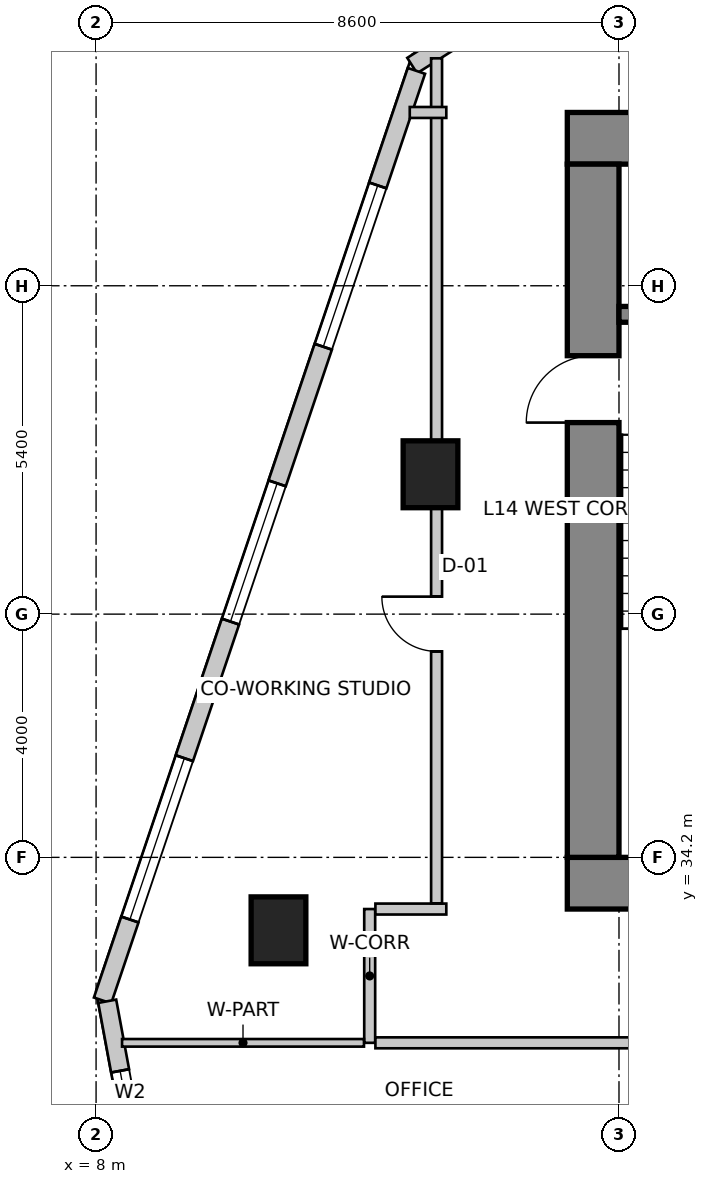
"""IFC4 building model, lengths in metres.
Left out: names, types, materials, properties, quantities, classifications, styles, units other than length and angle.
Written with IfcOpenShell. Run it as: python <this file> out.ifc"""

import sys

from ifc_helpers import new_model, si_unit, direction, frame, frame_2d, origin, origin_2d, place, context, subcontext, project, spatial, rectangle, extrude, source, transform, mapped, element, fill, save


model = new_model("IFC4")
c1 = context("Model", 3, precision=1e-05, world=origin(), true_north=direction((0.0, 1.0)))
c2 = subcontext(c1, "Body", "Model", "MODEL_VIEW")
j1 = project(units=[si_unit("LENGTHUNIT", "METRE"), si_unit("PLANEANGLEUNIT", "RADIAN")], contexts=[c1])
p1 = place(None, origin())
s1 = spatial("IfcSite", under=j1, at=p1, CompositionType="ELEMENT")
p2 = place(p1, origin())
s2 = spatial("IfcBuilding", under=s1, at=p2, CompositionType="ELEMENT")
p3 = place(p2, frame((0.0, 0.0, 59.0)))
s3 = spatial("IfcBuildingStorey", under=s2, at=p3, CompositionType="ELEMENT", Elevation=59.0)
p4 = place(p3, frame((15.75, 46.025, 0.0), z_axis=(0.0, 0.0, 1.0), x_axis=(1.0, 0.0, 0.0)))
e1 = element("IfcWall", 1, at=p4, inside=s3, PredefinedType="SHEAR", context=c2, shape_type="SweptSolid", body=[
    extrude(rectangle(XDim=16.1, YDim=0.85, at=frame_2d((8.05, 0.0))), origin(), (0.0, 0.0, 1.0), 4.0),
])
p5 = place(p3, frame((15.75, 33.775, 0.0), z_axis=(0.0, 0.0, 1.0), x_axis=(1.0, 0.0, 0.0)))
e2 = element("IfcWall", 2, at=p5, inside=s3, PredefinedType="SHEAR", context=c2, shape_type="SweptSolid", body=[
    extrude(rectangle(XDim=16.1, YDim=0.85, at=frame_2d((8.05, 0.0))), origin(), (0.0, 0.0, 1.0), 4.0),
])
m1 = source(origin(), c2, "Body", "SweptSolid", [
    extrude(rectangle(XDim=1.3, YDim=2.15, at=frame_2d((0.65, 1.075))), frame((0.0, 0.435, 0.0), z_axis=(0.0, -1.0, 0.0), x_axis=(1.0, 0.0, 0.0)), (0.0, 0.0, 1.0), 0.87),
])
p6 = place(p5, frame((10.18, 0.0, 0.0)))
e3 = element("IfcOpeningElement", 3, at=p6, cuts=e2, PredefinedType="OPENING", context=c2, shape_type="MappedRepresentation", body=[
    mapped(m1, transform((0.0, 0.0, 0.0), scale=1.0)),
])
p7 = place(p3, frame((16.175, 34.2, 0.0), z_axis=(0.0, 0.0, 1.0), x_axis=(0.0, 1.0, 0.0)))
e4 = element("IfcWall", 4, at=p7, inside=s3, PredefinedType="SHEAR", context=c2, shape_type="SweptSolid", body=[
    extrude(rectangle(XDim=11.4, YDim=0.85, at=frame_2d((5.7, 0.0))), origin(), (0.0, 0.0, 1.0), 4.0),
])
m2 = source(origin(), c2, "Body", "SweptSolid", [
    extrude(rectangle(XDim=1.1, YDim=2.15, at=frame_2d((0.55, 1.075))), frame((0.0, 0.435, 0.0), z_axis=(0.0, -1.0, 0.0), x_axis=(1.0, 0.0, 0.0)), (0.0, 0.0, 1.0), 0.87),
])
p8 = place(p7, frame((7.15, 0.0, 0.0)))
e5 = element("IfcOpeningElement", 5, at=p8, cuts=e4, PredefinedType="OPENING", context=c2, shape_type="MappedRepresentation", body=[
    mapped(m2, transform((0.0, 0.0, 0.0), scale=1.0)),
])
p9 = place(p3, frame((16.6, 43.13, 0.0), z_axis=(0.0, 0.0, 1.0), x_axis=(1.0, 0.0, 0.0)))
e6 = element("IfcWall", 6, at=p9, inside=s3, PredefinedType="SHEAR", context=c2, shape_type="SweptSolid", body=[
    extrude(rectangle(XDim=3.5, YDim=0.26, at=frame_2d((1.75, 0.0))), origin(), (0.0, 0.0, 1.0), 4.0),
])
m3 = source(origin(), c2, "Body", "SweptSolid", [
    extrude(rectangle(XDim=0.9, YDim=1.1, at=origin_2d()), origin(), (0.0, 0.0, 1.0), 4.0),
])
for number, where, z_axis, x_axis in (
    (7, (11.0, 33.0, 0.0), (0.0, 0.0, 1.0), (1.0, 0.0, 0.0)),
    (8, (13.5, 40.5, 0.0), (0.0, 0.0, 1.0), (1.0, 0.0, 0.0)),
):
    element("IfcColumn", number, at=place(p3, frame(where, z_axis=z_axis, x_axis=x_axis)), inside=s3, PredefinedType="COLUMN", context=c2, shape_type="MappedRepresentation", body=[
        mapped(m3, transform((0.0, 0.0, 0.0), scale=1.0)),
    ])
p10 = place(p3, frame((21.875, 52.743, 0.0), z_axis=(0.0, 0.0, 1.0), x_axis=(-0.843647802826, -0.536896996441, 0.0)))
e9 = element("IfcWall", 9, at=p10, inside=s3, PredefinedType="SOLIDWALL", context=c2, shape_type="SweptSolid", body=[
    extrude(rectangle(XDim=10.284, YDim=0.3, at=frame_2d((5.142, 0.0))), origin(), (0.0, 0.0, 1.0), 3.7),
])
m4 = source(origin(), c2, "Body", "SweptSolid", [
    extrude(rectangle(XDim=0.9, YDim=1.6, at=frame_2d((0.45, 0.8))), frame((0.0, 0.16, 0.0), z_axis=(0.0, -1.0, 0.0), x_axis=(1.0, 0.0, 0.0)), (0.0, 0.0, 1.0), 0.32),
])
p11 = place(p10, frame((0.629, 0.0, 0.85)))
e10 = element("IfcOpeningElement", 10, at=p11, cuts=e9, PredefinedType="OPENING", context=c2, shape_type="MappedRepresentation", body=[
    mapped(m4, transform((0.0, 0.0, 0.0), scale=1.0)),
])
m5 = source(origin(), c2, "Body", "SweptSolid", [
    extrude(rectangle(XDim=2.4, YDim=2.2, at=frame_2d((1.2, 1.1))), frame((0.0, 0.16, 0.0), z_axis=(0.0, -1.0, 0.0), x_axis=(1.0, 0.0, 0.0)), (0.0, 0.0, 1.0), 0.32),
])
p12 = place(p10, frame((3.542, 0.0, 0.85)))
e11 = element("IfcOpeningElement", 11, at=p12, cuts=e9, PredefinedType="OPENING", context=c2, shape_type="MappedRepresentation", body=[
    mapped(m5, transform((0.0, 0.0, 0.0), scale=1.0)),
])
m6 = source(origin(), c2, "Body", "SweptSolid", [
    extrude(rectangle(XDim=1.5, YDim=1.8, at=frame_2d((0.75, 0.9))), frame((0.0, 0.16, 0.0), z_axis=(0.0, -1.0, 0.0), x_axis=(1.0, 0.0, 0.0)), (0.0, 0.0, 1.0), 0.32),
])
p13 = place(p10, frame((7.904, 0.0, 0.85)))
e12 = element("IfcOpeningElement", 12, at=p13, cuts=e9, PredefinedType="OPENING", context=c2, shape_type="MappedRepresentation", body=[
    mapped(m6, transform((0.0, 0.0, 0.0), scale=1.0)),
])
p14 = place(p3, frame((13.269, 47.134, 0.0), z_axis=(0.0, 0.0, 1.0), x_axis=(-0.319920423265, -0.947444416722, 0.0)))
e13 = element("IfcWall", 13, at=p14, inside=s3, PredefinedType="SOLIDWALL", context=c2, shape_type="SweptSolid", body=[
    extrude(rectangle(XDim=16.135, YDim=0.3, at=frame_2d((8.067, 0.0))), origin(), (0.0, 0.0, 1.0), 3.7),
])
m7 = source(origin(), c2, "Body", "SweptSolid", [
    extrude(rectangle(XDim=2.8, YDim=2.4, at=frame_2d((1.4, 1.2))), frame((0.0, 0.16, 0.0), z_axis=(0.0, -1.0, 0.0), x_axis=(1.0, 0.0, 0.0)), (0.0, 0.0, 1.0), 0.32),
])
p15 = place(p14, frame((1.988, 0.0, 0.85)))
e14 = element("IfcOpeningElement", 14, at=p15, cuts=e13, PredefinedType="OPENING", context=c2, shape_type="MappedRepresentation", body=[
    mapped(m7, transform((0.0, 0.0, 0.0), scale=1.0)),
])
p16 = place(p14, frame((7.159, 0.0, 0.85)))
e15 = element("IfcOpeningElement", 15, at=p16, cuts=e13, PredefinedType="OPENING", context=c2, shape_type="MappedRepresentation", body=[
    mapped(m5, transform((0.0, 0.0, 0.0), scale=1.0)),
])
p17 = place(p14, frame((11.93, 0.0, 0.85)))
e16 = element("IfcOpeningElement", 16, at=p17, cuts=e13, PredefinedType="OPENING", context=c2, shape_type="MappedRepresentation", body=[
    mapped(m7, transform((0.0, 0.0, 0.0), scale=1.0)),
])
p18 = place(p3, frame((8.183, 31.833, 0.0), z_axis=(0.0, 0.0, 1.0), x_axis=(0.18216364648, -0.983268226834, 0.0)))
e17 = element("IfcWall", 17, at=p18, inside=s3, PredefinedType="SOLIDWALL", context=c2, shape_type="SweptSolid", body=[
    extrude(rectangle(XDim=26.678, YDim=0.3, at=frame_2d((13.339, 0.0))), origin(), (0.0, 0.0, 1.0), 3.7),
])
m8 = source(origin(), c2, "Body", "SweptSolid", [
    extrude(rectangle(XDim=1.8, YDim=2.1, at=frame_2d((0.9, 1.05))), frame((0.0, 0.16, 0.0), z_axis=(0.0, -1.0, 0.0), x_axis=(1.0, 0.0, 0.0)), (0.0, 0.0, 1.0), 0.32),
])
p19 = place(p18, frame((1.164, 0.0, 0.85)))
e18 = element("IfcOpeningElement", 18, at=p19, cuts=e17, PredefinedType="OPENING", context=c2, shape_type="MappedRepresentation", body=[
    mapped(m8, transform((0.0, 0.0, 0.0), scale=1.0)),
])
p20 = place(p18, frame((4.5, 0.0, 0.85)))
e19 = element("IfcOpeningElement", 19, at=p20, cuts=e17, PredefinedType="OPENING", context=c2, shape_type="MappedRepresentation", body=[
    mapped(m5, transform((0.0, 0.0, 0.0), scale=1.0)),
])
p21 = place(p18, frame((9.076, 0.0, 0.85)))
e20 = element("IfcOpeningElement", 20, at=p21, cuts=e17, PredefinedType="OPENING", context=c2, shape_type="MappedRepresentation", body=[
    mapped(m5, transform((0.0, 0.0, 0.0), scale=1.0)),
])
p22 = place(p18, frame((13.653, 0.0, 0.85)))
e21 = element("IfcOpeningElement", 21, at=p22, cuts=e17, PredefinedType="OPENING", context=c2, shape_type="MappedRepresentation", body=[
    mapped(m5, transform((0.0, 0.0, 0.0), scale=1.0)),
])
p23 = place(p18, frame((18.411, 0.0, 0.85)))
e22 = element("IfcOpeningElement", 22, at=p23, cuts=e17, PredefinedType="OPENING", context=c2, shape_type="MappedRepresentation", body=[
    mapped(m5, transform((0.0, 0.0, 0.0), scale=1.0)),
])
p24 = place(p18, frame((22.709, 0.0, 0.85)))
e23 = element("IfcOpeningElement", 23, at=p24, cuts=e17, PredefinedType="OPENING", context=c2, shape_type="MappedRepresentation", body=[
    mapped(m7, transform((0.0, 0.0, 0.0), scale=1.0)),
])
p25 = place(p3, frame((12.5, 31.15, 0.0), z_axis=(0.0, 0.0, 1.0), x_axis=(0.0, 1.0, 0.0)))
e24 = element("IfcWall", 24, at=p25, inside=s3, PredefinedType="PARTITIONING", context=c2, shape_type="SweptSolid", body=[
    extrude(rectangle(XDim=2.2, YDim=0.18, at=frame_2d((1.1, 0.0))), origin(), (0.0, 0.0, 1.0), 3.384),
])
p26 = place(p3, frame((12.594, 33.35, 0.0), z_axis=(0.0, 0.0, 1.0), x_axis=(1.0, 0.0, 0.0)))
e25 = element("IfcWall", 25, at=p26, inside=s3, PredefinedType="PARTITIONING", context=c2, shape_type="SweptSolid", body=[
    extrude(rectangle(XDim=1.166, YDim=0.18, at=frame_2d((0.583, 0.0))), origin(), (0.0, 0.0, 1.0), 3.7),
])
p27 = place(p3, frame((17.96, 31.15, 0.0), z_axis=(0.0, 0.0, 1.0), x_axis=(-1.0, 0.0, 0.0)))
e26 = element("IfcWall", 26, at=p27, inside=s3, PredefinedType="PARTITIONING", context=c2, shape_type="SweptSolid", body=[
    extrude(rectangle(XDim=5.366, YDim=0.18, at=frame_2d((2.683, 0.0))), origin(), (0.0, 0.0, 1.0), 3.384),
])
p28 = place(p3, frame((13.6, 33.444, 0.0), z_axis=(0.0, 0.0, 1.0), x_axis=(0.0, 1.0, 0.0)))
e27 = element("IfcWall", 27, at=p28, inside=s3, PredefinedType="PARTITIONING", context=c2, shape_type="SweptSolid", body=[
    extrude(rectangle(XDim=13.896, YDim=0.18, at=frame_2d((6.948, 0.0))), origin(), (0.0, 0.0, 1.0), 2.842),
])
m9 = source(origin(), c2, "Body", "SweptSolid", [
    extrude(rectangle(XDim=0.9, YDim=2.15, at=frame_2d((0.45, 1.075))), frame((0.0, 0.1, 0.0), z_axis=(0.0, -1.0, 0.0), x_axis=(1.0, 0.0, 0.0)), (0.0, 0.0, 1.0), 0.2),
])
p29 = place(p28, frame((4.144, 0.0, 0.0)))
e28 = element("IfcOpeningElement", 28, at=p29, cuts=e27, PredefinedType="OPENING", context=c2, shape_type="MappedRepresentation", body=[
    mapped(m9, transform((0.0, 0.0, 0.0), scale=1.0)),
])
p30 = place(p3, frame((13.76, 46.45, 0.0), z_axis=(0.0, 0.0, 1.0), x_axis=(-1.0, 0.0, 0.0)))
e29 = element("IfcWall", 29, at=p30, inside=s3, PredefinedType="PARTITIONING", context=c2, shape_type="SweptSolid", body=[
    extrude(rectangle(XDim=0.601, YDim=0.18, at=frame_2d((0.301, 0.0))), origin(), (0.0, 0.0, 1.0), 3.7),
])
p31 = place(p3, frame((12.406, 31.15, 0.0), z_axis=(0.0, 0.0, 1.0), x_axis=(-1.0, 0.0, 0.0)))
e30 = element("IfcWall", 30, at=p31, inside=s3, PredefinedType="PARTITIONING", context=c2, shape_type="SweptSolid", body=[
    extrude(rectangle(XDim=3.979, YDim=0.125, at=frame_2d((1.99, 0.0))), origin(), (0.0, 0.0, 1.0), 2.842),
])
m10 = source(origin(), c2, "Body", "SweptSolid", [
    extrude(rectangle(XDim=2.8, YDim=2.4, at=frame_2d((1.4, 1.2))), frame((0.0, -0.015, 0.0), z_axis=(0.0, -1.0, 0.0), x_axis=(1.0, 0.0, 0.0)), (0.0, 0.0, 1.0), 0.06),
])
p32 = place(p15, origin())
e31 = element("IfcWindow", 31, at=p32, inside=s3, PartitioningType="SINGLE_PANEL", PredefinedType="WINDOW", context=c2, shape_type="MappedRepresentation", body=[
    mapped(m10, transform((0.0, 0.0, 0.0), scale=1.0)),
])
fill(e14, e31)
m11 = source(origin(), c2, "Body", "SweptSolid", [
    extrude(rectangle(XDim=2.4, YDim=2.2, at=frame_2d((1.2, 1.1))), frame((0.0, -0.015, 0.0), z_axis=(0.0, -1.0, 0.0), x_axis=(1.0, 0.0, 0.0)), (0.0, 0.0, 1.0), 0.06),
])
p33 = place(p16, origin())
e32 = element("IfcWindow", 32, at=p33, inside=s3, PartitioningType="SINGLE_PANEL", PredefinedType="WINDOW", context=c2, shape_type="MappedRepresentation", body=[
    mapped(m11, transform((0.0, 0.0, 0.0), scale=1.0)),
])
fill(e15, e32)
p34 = place(p17, origin())
e33 = element("IfcWindow", 33, at=p34, inside=s3, PartitioningType="SINGLE_PANEL", PredefinedType="WINDOW", context=c2, shape_type="MappedRepresentation", body=[
    mapped(m10, transform((0.0, 0.0, 0.0), scale=1.0)),
])
fill(e16, e33)
m12 = source(origin(), c2, "Body", "SweptSolid", [
    extrude(rectangle(XDim=1.8, YDim=2.1, at=frame_2d((0.9, 1.05))), frame((0.0, -0.015, 0.0), z_axis=(0.0, -1.0, 0.0), x_axis=(1.0, 0.0, 0.0)), (0.0, 0.0, 1.0), 0.06),
])
p35 = place(p19, origin())
e34 = element("IfcWindow", 34, at=p35, inside=s3, PartitioningType="SINGLE_PANEL", PredefinedType="WINDOW", context=c2, shape_type="MappedRepresentation", body=[
    mapped(m12, transform((0.0, 0.0, 0.0), scale=1.0)),
])
fill(e18, e34)
m13 = source(origin(), c2, "Body", "SweptSolid", [
    extrude(rectangle(XDim=1.1, YDim=2.15, at=frame_2d((0.55, 1.075))), frame((0.0, 0.025, 0.0), z_axis=(0.0, -1.0, 0.0), x_axis=(1.0, 0.0, 0.0)), (0.0, 0.0, 1.0), 0.05),
])
p36 = place(p8, origin())
e35 = element("IfcDoor", 35, at=p36, inside=s3, OperationType="SINGLE_SWING_LEFT", PredefinedType="DOOR", context=c2, shape_type="MappedRepresentation", body=[
    mapped(m13, transform((0.0, 0.0, 0.0), scale=1.0)),
])
fill(e5, e35)
m14 = source(origin(), c2, "Body", "SweptSolid", [
    extrude(rectangle(XDim=0.9, YDim=2.15, at=frame_2d((0.45, 1.075))), frame((0.0, 0.025, 0.0), z_axis=(0.0, -1.0, 0.0), x_axis=(1.0, 0.0, 0.0)), (0.0, 0.0, 1.0), 0.05),
])
p37 = place(p29, origin())
e36 = element("IfcDoor", 36, at=p37, inside=s3, OperationType="SINGLE_SWING_RIGHT", PredefinedType="DOOR", context=c2, shape_type="MappedRepresentation", body=[
    mapped(m14, transform((0.0, 0.0, 0.0), scale=1.0)),
])
fill(e28, e36)
save(model, sys.argv[1])
